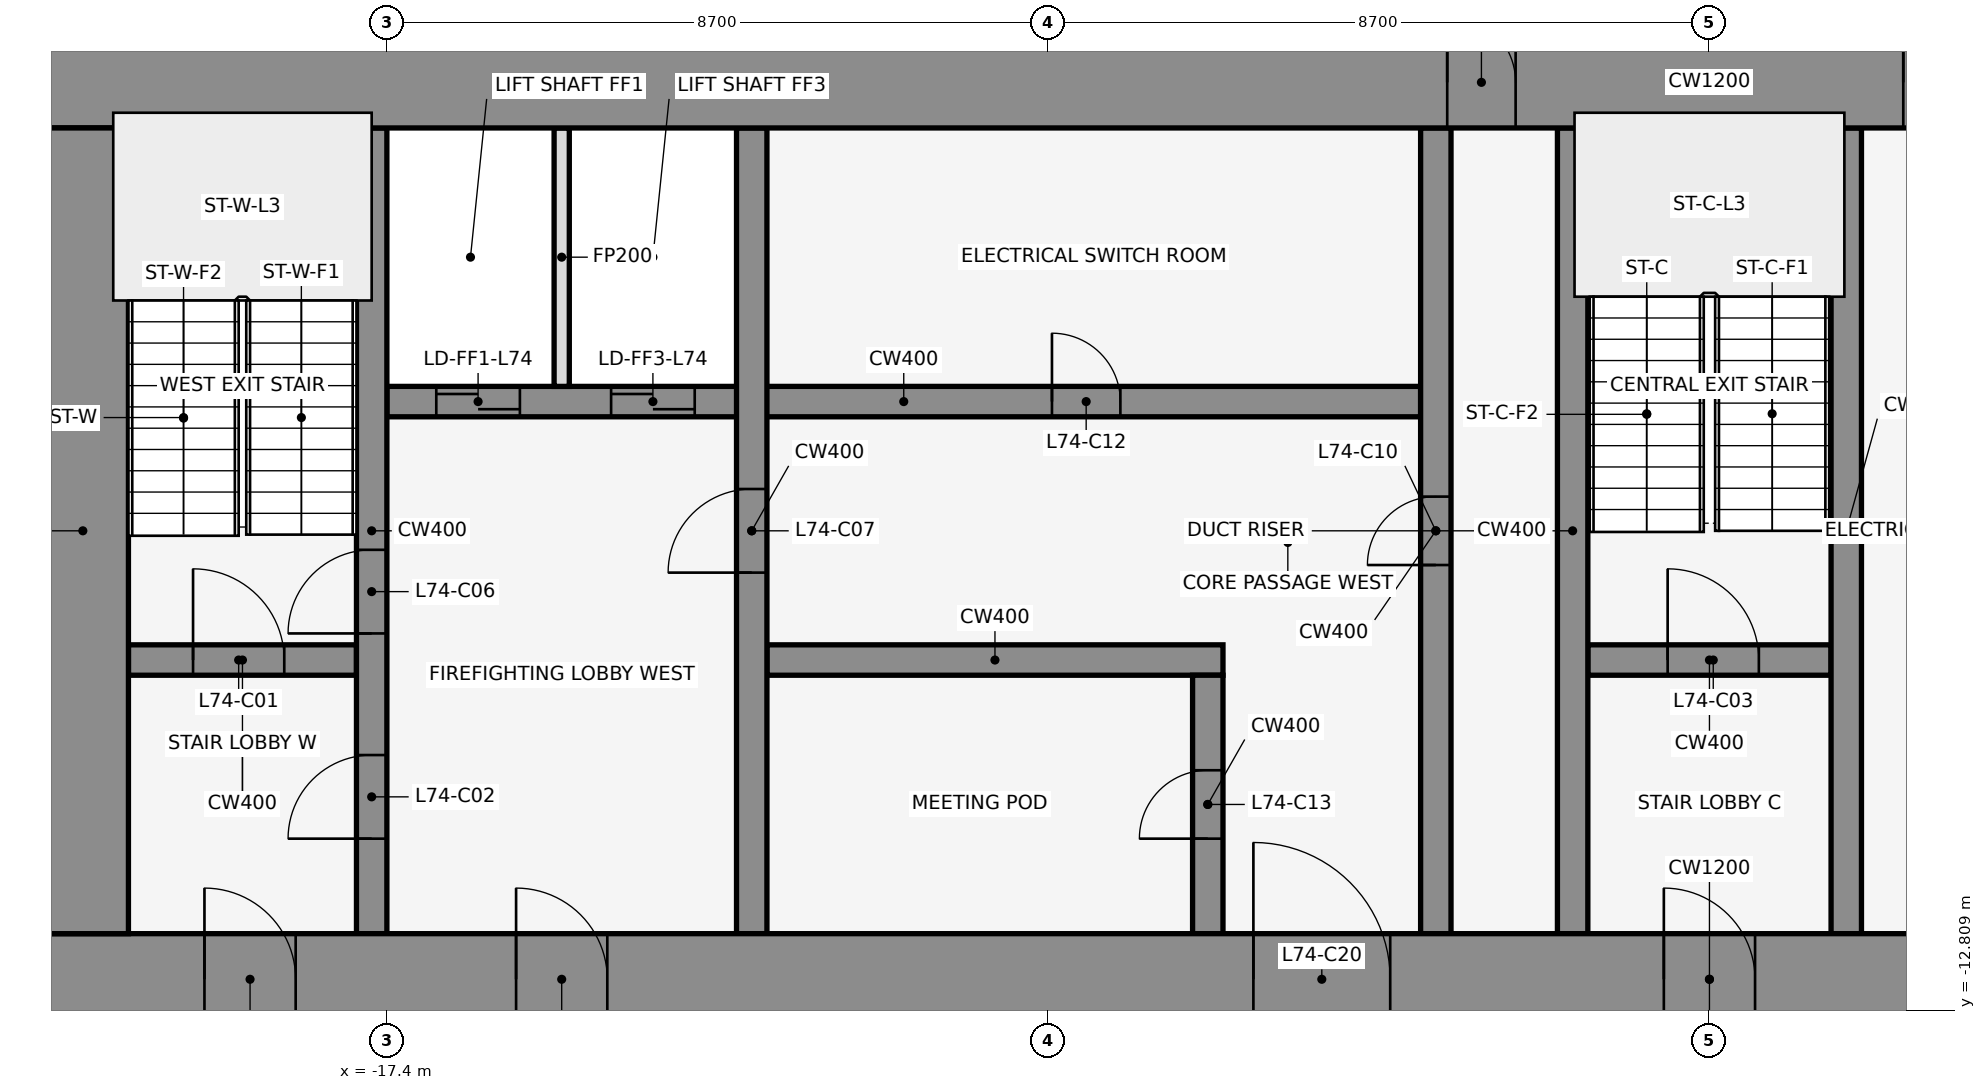
"""IFC4 building model, lengths in metres.
Left out: names, types, materials, properties, quantities, classifications, styles, units other than length and angle.
Written with IfcOpenShell. Run it as: python <this file> out.ifc"""

import sys

from ifc_helpers import new_model, si_unit, direction, frame, frame_2d, origin, place, context, subcontext, project, spatial, rectangle, extrude, element, fill, save


model = new_model("IFC4")
c1 = context("Model", 3, precision=1e-05, world=origin(), true_north=direction((0.0, 1.0)))
c2 = subcontext(c1, "Body", "Model", "MODEL_VIEW")
j1 = project(units=[si_unit("LENGTHUNIT", "METRE"), si_unit("PLANEANGLEUNIT", "RADIAN")], contexts=[c1])
p1 = place(None, origin())
s1 = spatial("IfcSite", under=j1, at=p1, CompositionType="ELEMENT")
p2 = place(p1, origin())
s2 = spatial("IfcBuilding", under=s1, at=p2, CompositionType="ELEMENT")
p3 = place(p2, frame((0.0, 0.0, 329.0)))
s3 = spatial("IfcBuildingStorey", under=s2, at=p3, CompositionType="ELEMENT", Elevation=329.0)
for number, where, z_axis, x_axis in (
    (1, (1.901, 1.08, 0.0), (0.0, 0.0, 1.0), (-0.84, -0.543, 0.0)),
    (2, (-0.068, -0.105, 0.0), (0.0, 0.0, 1.0), (-0.84, 0.543, 0.0)),
    (3, (-14.599, 1.08, 0.0), (0.0, 0.0, 1.0), (-0.84, -0.543, 0.0)),
):
    element("IfcWall", number, at=place(p3, frame(where, z_axis=z_axis, x_axis=x_axis)), inside=s3, PredefinedType="STANDARD", context=c2, shape_type="SweptSolid", body=[
        extrude(rectangle(XDim=2.183, YDim=0.25, at=frame_2d((1.091, 0.0))), origin(), (0.0, 0.0, 1.0), 4.35),
    ])
p4 = place(p3, frame((-20.8, -8.2, 0.0), z_axis=(0.0, 0.0, 1.0), x_axis=(1.0, 0.0, 0.0)))
e4 = element("IfcWall", 4, at=p4, inside=s3, PredefinedType="SHEAR", context=c2, shape_type="SweptSolid", body=[
    extrude(rectangle(XDim=3.0, YDim=0.4, at=frame_2d((1.5, 0.0))), origin(), (0.0, 0.0, 1.0), 4.5),
])
p5 = place(p4, frame((0.85, 0.0, 0.0)))
e5 = element("IfcOpeningElement", 5, at=p5, cuts=e4, PredefinedType="OPENING", context=c2, shape_type="SweptSolid", body=[
    extrude(rectangle(XDim=1.2, YDim=2.1, at=frame_2d((0.6, 1.05))), frame((0.0, 0.212, 0.0), z_axis=(0.0, -1.0, 0.0), x_axis=(1.0, 0.0, 0.0)), (0.0, 0.0, 1.0), 0.424),
])
p6 = place(p3, frame((-12.4, -8.2, 0.0), z_axis=(0.0, 0.0, 1.0), x_axis=(1.0, 0.0, 0.0)))
e6 = element("IfcWall", 6, at=p6, inside=s3, PredefinedType="SHEAR", context=c2, shape_type="SweptSolid", body=[
    extrude(rectangle(XDim=6.0, YDim=0.4, at=frame_2d((3.0, 0.0))), origin(), (0.0, 0.0, 1.0), 4.5),
])
p7 = place(p3, frame((-1.6, -8.2, 0.0), z_axis=(0.0, 0.0, 1.0), x_axis=(1.0, 0.0, 0.0)))
e7 = element("IfcWall", 7, at=p7, inside=s3, PredefinedType="SHEAR", context=c2, shape_type="SweptSolid", body=[
    extrude(rectangle(XDim=3.2, YDim=0.4, at=frame_2d((1.6, 0.0))), origin(), (0.0, 0.0, 1.0), 4.5),
])
p8 = place(p7, frame((1.05, 0.0, 0.0)))
e8 = element("IfcOpeningElement", 8, at=p8, cuts=e7, PredefinedType="OPENING", context=c2, shape_type="SweptSolid", body=[
    extrude(rectangle(XDim=1.2, YDim=2.1, at=frame_2d((0.6, 1.05))), frame((0.0, 0.212, 0.0), z_axis=(0.0, -1.0, 0.0), x_axis=(1.0, 0.0, 0.0)), (0.0, 0.0, 1.0), 0.424),
])
p9 = place(p3, frame((-17.4, -4.8, 0.0), z_axis=(0.0, 0.0, 1.0), x_axis=(1.0, 0.0, 0.0)))
e9 = element("IfcWall", 9, at=p9, inside=s3, PredefinedType="SHEAR", context=c2, shape_type="SweptSolid", body=[
    extrude(rectangle(XDim=13.6, YDim=0.4, at=frame_2d((6.8, 0.0))), origin(), (0.0, 0.0, 1.0), 4.5),
])
p10 = place(p9, frame((0.65, 0.0, 0.0)))
e10 = element("IfcOpeningElement", 10, at=p10, cuts=e9, PredefinedType="OPENING", context=c2, shape_type="SweptSolid", body=[
    extrude(rectangle(XDim=1.1, YDim=2.1, at=frame_2d((0.55, 1.05))), frame((0.0, 0.212, 0.0), z_axis=(0.0, -1.0, 0.0), x_axis=(1.0, 0.0, 0.0)), (0.0, 0.0, 1.0), 0.424),
])
p11 = place(p9, frame((2.95, 0.0, 0.0)))
e11 = element("IfcOpeningElement", 11, at=p11, cuts=e9, PredefinedType="OPENING", context=c2, shape_type="SweptSolid", body=[
    extrude(rectangle(XDim=1.1, YDim=2.1, at=frame_2d((0.55, 1.05))), frame((0.0, 0.212, 0.0), z_axis=(0.0, -1.0, 0.0), x_axis=(1.0, 0.0, 0.0)), (0.0, 0.0, 1.0), 0.424),
])
p12 = place(p9, frame((8.75, 0.0, 0.0)))
e12 = element("IfcOpeningElement", 12, at=p12, cuts=e9, PredefinedType="OPENING", context=c2, shape_type="SweptSolid", body=[
    extrude(rectangle(XDim=0.9, YDim=2.1, at=frame_2d((0.45, 1.05))), frame((0.0, 0.212, 0.0), z_axis=(0.0, -1.0, 0.0), x_axis=(1.0, 0.0, 0.0)), (0.0, 0.0, 1.0), 0.424),
])
p13 = place(p3, frame((-17.6, -11.8, 0.0), z_axis=(0.0, 0.0, 1.0), x_axis=(0.0, 1.0, 0.0)))
e13 = element("IfcWall", 13, at=p13, inside=s3, PredefinedType="SHEAR", context=c2, shape_type="SweptSolid", body=[
    extrude(rectangle(XDim=10.6, YDim=0.4, at=frame_2d((5.3, 0.0))), origin(), (0.0, 0.0, 1.0), 4.5),
])
p14 = place(p13, frame((1.25, 0.0, 0.0)))
e14 = element("IfcOpeningElement", 14, at=p14, cuts=e13, PredefinedType="OPENING", context=c2, shape_type="SweptSolid", body=[
    extrude(rectangle(XDim=1.1, YDim=2.1, at=frame_2d((0.55, 1.05))), frame((0.0, 0.212, 0.0), z_axis=(0.0, -1.0, 0.0), x_axis=(1.0, 0.0, 0.0)), (0.0, 0.0, 1.0), 0.424),
])
p15 = place(p13, frame((3.95, 0.0, 0.0)))
e15 = element("IfcOpeningElement", 15, at=p15, cuts=e13, PredefinedType="OPENING", context=c2, shape_type="SweptSolid", body=[
    extrude(rectangle(XDim=1.1, YDim=2.1, at=frame_2d((0.55, 1.05))), frame((0.0, 0.212, 0.0), z_axis=(0.0, -1.0, 0.0), x_axis=(1.0, 0.0, 0.0)), (0.0, 0.0, 1.0), 0.424),
])
p16 = place(p3, frame((-15.1, -4.6, 0.0), z_axis=(0.0, 0.0, 1.0), x_axis=(0.0, 1.0, 0.0)))
e16 = element("IfcWall", 16, at=p16, inside=s3, PredefinedType="PARTITIONING", context=c2, shape_type="SweptSolid", body=[
    extrude(rectangle(XDim=3.4, YDim=0.2, at=frame_2d((1.7, 0.0))), origin(), (0.0, 0.0, 1.0), 3.418),
])
p17 = place(p3, frame((-12.6, -11.8, 0.0), z_axis=(0.0, 0.0, 1.0), x_axis=(0.0, 1.0, 0.0)))
e17 = element("IfcWall", 17, at=p17, inside=s3, PredefinedType="SHEAR", context=c2, shape_type="SweptSolid", body=[
    extrude(rectangle(XDim=10.6, YDim=0.4, at=frame_2d((5.3, 0.0))), origin(), (0.0, 0.0, 1.0), 4.5),
])
p18 = place(p17, frame((4.75, 0.0, 0.0)))
e18 = element("IfcOpeningElement", 18, at=p18, cuts=e17, PredefinedType="OPENING", context=c2, shape_type="SweptSolid", body=[
    extrude(rectangle(XDim=1.1, YDim=2.1, at=frame_2d((0.55, 1.05))), frame((0.0, 0.212, 0.0), z_axis=(0.0, -1.0, 0.0), x_axis=(1.0, 0.0, 0.0)), (0.0, 0.0, 1.0), 0.424),
])
p19 = place(p3, frame((-6.6, -11.8, 0.0), z_axis=(0.0, 0.0, 1.0), x_axis=(0.0, 1.0, 0.0)))
e19 = element("IfcWall", 19, at=p19, inside=s3, PredefinedType="SHEAR", context=c2, shape_type="SweptSolid", body=[
    extrude(rectangle(XDim=3.4, YDim=0.4, at=frame_2d((1.7, 0.0))), origin(), (0.0, 0.0, 1.0), 4.5),
])
p20 = place(p19, frame((1.25, 0.0, 0.0)))
e20 = element("IfcOpeningElement", 20, at=p20, cuts=e19, PredefinedType="OPENING", context=c2, shape_type="SweptSolid", body=[
    extrude(rectangle(XDim=0.9, YDim=2.1, at=frame_2d((0.45, 1.05))), frame((0.0, 0.212, 0.0), z_axis=(0.0, -1.0, 0.0), x_axis=(1.0, 0.0, 0.0)), (0.0, 0.0, 1.0), 0.424),
])
p21 = place(p3, frame((-3.6, -11.8, 0.0), z_axis=(0.0, 0.0, 1.0), x_axis=(0.0, 1.0, 0.0)))
e21 = element("IfcWall", 21, at=p21, inside=s3, PredefinedType="SHEAR", context=c2, shape_type="SweptSolid", body=[
    extrude(rectangle(XDim=10.6, YDim=0.4, at=frame_2d((5.3, 0.0))), origin(), (0.0, 0.0, 1.0), 4.5),
])
p22 = place(p21, frame((4.85, 0.0, 0.0)))
e22 = element("IfcOpeningElement", 22, at=p22, cuts=e21, PredefinedType="OPENING", context=c2, shape_type="SweptSolid", body=[
    extrude(rectangle(XDim=0.9, YDim=2.1, at=frame_2d((0.45, 1.05))), frame((0.0, 0.212, 0.0), z_axis=(0.0, -1.0, 0.0), x_axis=(1.0, 0.0, 0.0)), (0.0, 0.0, 1.0), 0.424),
])
for number, where, z_axis, x_axis in (
    (23, (-1.8, -11.8, 0.0), (0.0, 0.0, 1.0), (0.0, 1.0, 0.0)),
    (24, (1.8, -11.8, 0.0), (0.0, 0.0, 1.0), (0.0, 1.0, 0.0)),
):
    element("IfcWall", number, at=place(p3, frame(where, z_axis=z_axis, x_axis=x_axis)), inside=s3, PredefinedType="SHEAR", context=c2, shape_type="SweptSolid", body=[
        extrude(rectangle(XDim=10.6, YDim=0.4, at=frame_2d((5.3, 0.0))), origin(), (0.0, 0.0, 1.0), 4.5),
    ])
p23 = place(p3, frame((-22.0, -0.6, 0.0), z_axis=(0.0, 0.0, 1.0), x_axis=(1.0, 0.0, 0.0)))
e25 = element("IfcWall", 25, at=p23, inside=s3, PredefinedType="SHEAR", context=c2, shape_type="SweptSolid", body=[
    extrude(rectangle(XDim=44.0, YDim=1.2, at=frame_2d((22.0, 0.0))), origin(), (0.0, 0.0, 1.0), 4.5),
])
p24 = place(p23, frame((18.55, 0.0, 0.0)))
e26 = element("IfcOpeningElement", 26, at=p24, cuts=e25, PredefinedType="OPENING", context=c2, shape_type="SweptSolid", body=[
    extrude(rectangle(XDim=0.9, YDim=2.1, at=frame_2d((0.45, 1.05))), frame((0.0, 0.612, 0.0), z_axis=(0.0, -1.0, 0.0), x_axis=(1.0, 0.0, 0.0)), (0.0, 0.0, 1.0), 1.224),
])
p25 = place(p23, frame((24.55, 0.0, 0.0)))
e27 = element("IfcOpeningElement", 27, at=p25, cuts=e25, PredefinedType="OPENING", context=c2, shape_type="SweptSolid", body=[
    extrude(rectangle(XDim=0.9, YDim=2.1, at=frame_2d((0.45, 1.05))), frame((0.0, 0.612, 0.0), z_axis=(0.0, -1.0, 0.0), x_axis=(1.0, 0.0, 0.0)), (0.0, 0.0, 1.0), 1.224),
])
p26 = place(p3, frame((-22.0, -12.4, 0.0), z_axis=(0.0, 0.0, 1.0), x_axis=(1.0, 0.0, 0.0)))
e28 = element("IfcWall", 28, at=p26, inside=s3, PredefinedType="SHEAR", context=c2, shape_type="SweptSolid", body=[
    extrude(rectangle(XDim=44.0, YDim=1.2, at=frame_2d((22.0, 0.0))), origin(), (0.0, 0.0, 1.0), 4.5),
])
p27 = place(p26, frame((2.2, 0.0, 0.0)))
e29 = element("IfcOpeningElement", 29, at=p27, cuts=e28, PredefinedType="OPENING", context=c2, shape_type="SweptSolid", body=[
    extrude(rectangle(XDim=1.2, YDim=2.1, at=frame_2d((0.6, 1.05))), frame((0.0, 0.612, 0.0), z_axis=(0.0, -1.0, 0.0), x_axis=(1.0, 0.0, 0.0)), (0.0, 0.0, 1.0), 1.224),
])
p28 = place(p26, frame((21.4, 0.0, 0.0)))
e30 = element("IfcOpeningElement", 30, at=p28, cuts=e28, PredefinedType="OPENING", context=c2, shape_type="SweptSolid", body=[
    extrude(rectangle(XDim=1.2, YDim=2.1, at=frame_2d((0.6, 1.05))), frame((0.0, 0.612, 0.0), z_axis=(0.0, -1.0, 0.0), x_axis=(1.0, 0.0, 0.0)), (0.0, 0.0, 1.0), 1.224),
])
p29 = place(p26, frame((40.6, 0.0, 0.0)))
e31 = element("IfcOpeningElement", 31, at=p29, cuts=e28, PredefinedType="OPENING", context=c2, shape_type="SweptSolid", body=[
    extrude(rectangle(XDim=1.2, YDim=2.1, at=frame_2d((0.6, 1.05))), frame((0.0, 0.612, 0.0), z_axis=(0.0, -1.0, 0.0), x_axis=(1.0, 0.0, 0.0)), (0.0, 0.0, 1.0), 1.224),
])
p30 = place(p26, frame((16.0, 0.0, 0.0)))
e32 = element("IfcOpeningElement", 32, at=p30, cuts=e28, PredefinedType="OPENING", context=c2, shape_type="SweptSolid", body=[
    extrude(rectangle(XDim=1.8, YDim=2.1, at=frame_2d((0.9, 1.05))), frame((0.0, 0.612, 0.0), z_axis=(0.0, -1.0, 0.0), x_axis=(1.0, 0.0, 0.0)), (0.0, 0.0, 1.0), 1.224),
])
p31 = place(p26, frame((6.3, 0.0, 0.0)))
e33 = element("IfcOpeningElement", 33, at=p31, cuts=e28, PredefinedType="OPENING", context=c2, shape_type="SweptSolid", body=[
    extrude(rectangle(XDim=1.2, YDim=2.1, at=frame_2d((0.6, 1.05))), frame((0.0, 0.612, 0.0), z_axis=(0.0, -1.0, 0.0), x_axis=(1.0, 0.0, 0.0)), (0.0, 0.0, 1.0), 1.224),
])
p32 = place(p26, frame((26.2, 0.0, 0.0)))
e34 = element("IfcOpeningElement", 34, at=p32, cuts=e28, PredefinedType="OPENING", context=c2, shape_type="SweptSolid", body=[
    extrude(rectangle(XDim=1.8, YDim=2.1, at=frame_2d((0.9, 1.05))), frame((0.0, 0.612, 0.0), z_axis=(0.0, -1.0, 0.0), x_axis=(1.0, 0.0, 0.0)), (0.0, 0.0, 1.0), 1.224),
])
p33 = place(p26, frame((36.5, 0.0, 0.0)))
e35 = element("IfcOpeningElement", 35, at=p33, cuts=e28, PredefinedType="OPENING", context=c2, shape_type="SweptSolid", body=[
    extrude(rectangle(XDim=1.2, YDim=2.1, at=frame_2d((0.6, 1.05))), frame((0.0, 0.612, 0.0), z_axis=(0.0, -1.0, 0.0), x_axis=(1.0, 0.0, 0.0)), (0.0, 0.0, 1.0), 1.224),
])
p34 = place(p3, frame((-21.4, -11.8, 0.0), z_axis=(0.0, 0.0, 1.0), x_axis=(0.0, 1.0, 0.0)))
e36 = element("IfcWall", 36, at=p34, inside=s3, PredefinedType="SHEAR", context=c2, shape_type="SweptSolid", body=[
    extrude(rectangle(XDim=10.6, YDim=1.2, at=frame_2d((5.3, 0.0))), origin(), (0.0, 0.0, 1.0), 4.5),
])
p35 = place(p5, origin())
e37 = element("IfcDoor", 37, at=p35, inside=s3, OperationType="SINGLE_SWING_LEFT", PredefinedType="DOOR", context=c2, shape_type="SweptSolid", body=[
    extrude(rectangle(XDim=1.2, YDim=2.1, at=frame_2d((0.6, 1.05))), frame((0.0, 0.025, 0.0), z_axis=(0.0, -1.0, 0.0), x_axis=(1.0, 0.0, 0.0)), (0.0, 0.0, 1.0), 0.05),
])
fill(e5, e37)
p36 = place(p14, frame((1.1, 0.0, 0.0), z_axis=(0.0, 0.0, 1.0), x_axis=(-1.0, 0.0, 0.0)))
e38 = element("IfcDoor", 38, at=p36, inside=s3, OperationType="SINGLE_SWING_LEFT", PredefinedType="DOOR", context=c2, shape_type="SweptSolid", body=[
    extrude(rectangle(XDim=1.1, YDim=2.1, at=frame_2d((0.55, 1.05))), frame((0.0, 0.025, 0.0), z_axis=(0.0, -1.0, 0.0), x_axis=(1.0, 0.0, 0.0)), (0.0, 0.0, 1.0), 0.05),
])
fill(e14, e38)
p37 = place(p8, origin())
e39 = element("IfcDoor", 39, at=p37, inside=s3, OperationType="SINGLE_SWING_LEFT", PredefinedType="DOOR", context=c2, shape_type="SweptSolid", body=[
    extrude(rectangle(XDim=1.2, YDim=2.1, at=frame_2d((0.6, 1.05))), frame((0.0, 0.025, 0.0), z_axis=(0.0, -1.0, 0.0), x_axis=(1.0, 0.0, 0.0)), (0.0, 0.0, 1.0), 0.05),
])
fill(e8, e39)
p38 = place(p10, origin())
e40 = element("IfcDoor", 40, at=p38, inside=s3, OperationType="DOUBLE_DOOR_SLIDING", PredefinedType="DOOR", context=c2, shape_type="SweptSolid", body=[
    extrude(rectangle(XDim=1.1, YDim=2.1, at=frame_2d((0.55, 1.05))), frame((0.0, 0.025, 0.0), z_axis=(0.0, -1.0, 0.0), x_axis=(1.0, 0.0, 0.0)), (0.0, 0.0, 1.0), 0.05),
])
fill(e10, e40)
p39 = place(p11, origin())
e41 = element("IfcDoor", 41, at=p39, inside=s3, OperationType="DOUBLE_DOOR_SLIDING", PredefinedType="DOOR", context=c2, shape_type="SweptSolid", body=[
    extrude(rectangle(XDim=1.1, YDim=2.1, at=frame_2d((0.55, 1.05))), frame((0.0, 0.025, 0.0), z_axis=(0.0, -1.0, 0.0), x_axis=(1.0, 0.0, 0.0)), (0.0, 0.0, 1.0), 0.05),
])
fill(e11, e41)
p40 = place(p15, frame((1.1, 0.0, 0.0), z_axis=(0.0, 0.0, 1.0), x_axis=(-1.0, 0.0, 0.0)))
e42 = element("IfcDoor", 42, at=p40, inside=s3, OperationType="SINGLE_SWING_LEFT", PredefinedType="DOOR", context=c2, shape_type="SweptSolid", body=[
    extrude(rectangle(XDim=1.1, YDim=2.1, at=frame_2d((0.55, 1.05))), frame((0.0, 0.025, 0.0), z_axis=(0.0, -1.0, 0.0), x_axis=(1.0, 0.0, 0.0)), (0.0, 0.0, 1.0), 0.05),
])
fill(e15, e42)
p41 = place(p18, origin())
e43 = element("IfcDoor", 43, at=p41, inside=s3, OperationType="SINGLE_SWING_LEFT", PredefinedType="DOOR", context=c2, shape_type="SweptSolid", body=[
    extrude(rectangle(XDim=1.1, YDim=2.1, at=frame_2d((0.55, 1.05))), frame((0.0, 0.025, 0.0), z_axis=(0.0, -1.0, 0.0), x_axis=(1.0, 0.0, 0.0)), (0.0, 0.0, 1.0), 0.05),
])
fill(e18, e43)
p42 = place(p22, frame((0.9, 0.0, 0.0), z_axis=(0.0, 0.0, 1.0), x_axis=(-1.0, 0.0, 0.0)))
e44 = element("IfcDoor", 44, at=p42, inside=s3, OperationType="SINGLE_SWING_LEFT", PredefinedType="DOOR", context=c2, shape_type="SweptSolid", body=[
    extrude(rectangle(XDim=0.9, YDim=2.1, at=frame_2d((0.45, 1.05))), frame((0.0, 0.025, 0.0), z_axis=(0.0, -1.0, 0.0), x_axis=(1.0, 0.0, 0.0)), (0.0, 0.0, 1.0), 0.05),
])
fill(e22, e44)
p43 = place(p12, origin())
e45 = element("IfcDoor", 45, at=p43, inside=s3, OperationType="SINGLE_SWING_RIGHT", PredefinedType="DOOR", context=c2, shape_type="SweptSolid", body=[
    extrude(rectangle(XDim=0.9, YDim=2.1, at=frame_2d((0.45, 1.05))), frame((0.0, 0.025, 0.0), z_axis=(0.0, -1.0, 0.0), x_axis=(1.0, 0.0, 0.0)), (0.0, 0.0, 1.0), 0.05),
])
fill(e12, e45)
p44 = place(p20, origin())
e46 = element("IfcDoor", 46, at=p44, inside=s3, OperationType="SINGLE_SWING_LEFT", PredefinedType="DOOR", context=c2, shape_type="SweptSolid", body=[
    extrude(rectangle(XDim=0.9, YDim=2.1, at=frame_2d((0.45, 1.05))), frame((0.0, 0.025, 0.0), z_axis=(0.0, -1.0, 0.0), x_axis=(1.0, 0.0, 0.0)), (0.0, 0.0, 1.0), 0.05),
])
fill(e20, e46)
p45 = place(p24, origin())
e47 = element("IfcDoor", 47, at=p45, inside=s3, OperationType="SINGLE_SWING_LEFT", PredefinedType="DOOR", context=c2, shape_type="SweptSolid", body=[
    extrude(rectangle(XDim=0.9, YDim=2.1, at=frame_2d((0.45, 1.05))), frame((0.0, 0.025, 0.0), z_axis=(0.0, -1.0, 0.0), x_axis=(1.0, 0.0, 0.0)), (0.0, 0.0, 1.0), 0.05),
])
fill(e26, e47)
p46 = place(p25, origin())
e48 = element("IfcDoor", 48, at=p46, inside=s3, OperationType="SINGLE_SWING_LEFT", PredefinedType="DOOR", context=c2, shape_type="SweptSolid", body=[
    extrude(rectangle(XDim=0.9, YDim=2.1, at=frame_2d((0.45, 1.05))), frame((0.0, 0.025, 0.0), z_axis=(0.0, -1.0, 0.0), x_axis=(1.0, 0.0, 0.0)), (0.0, 0.0, 1.0), 0.05),
])
fill(e27, e48)
p47 = place(p27, frame((1.2, 0.0, 0.0), z_axis=(0.0, 0.0, 1.0), x_axis=(-1.0, 0.0, 0.0)))
e49 = element("IfcDoor", 49, at=p47, inside=s3, OperationType="SINGLE_SWING_RIGHT", PredefinedType="DOOR", context=c2, shape_type="SweptSolid", body=[
    extrude(rectangle(XDim=1.2, YDim=2.1, at=frame_2d((0.6, 1.05))), frame((0.0, 0.025, 0.0), z_axis=(0.0, -1.0, 0.0), x_axis=(1.0, 0.0, 0.0)), (0.0, 0.0, 1.0), 0.05),
])
fill(e29, e49)
p48 = place(p28, frame((1.2, 0.0, 0.0), z_axis=(0.0, 0.0, 1.0), x_axis=(-1.0, 0.0, 0.0)))
e50 = element("IfcDoor", 50, at=p48, inside=s3, OperationType="SINGLE_SWING_RIGHT", PredefinedType="DOOR", context=c2, shape_type="SweptSolid", body=[
    extrude(rectangle(XDim=1.2, YDim=2.1, at=frame_2d((0.6, 1.05))), frame((0.0, 0.025, 0.0), z_axis=(0.0, -1.0, 0.0), x_axis=(1.0, 0.0, 0.0)), (0.0, 0.0, 1.0), 0.05),
])
fill(e30, e50)
p49 = place(p30, origin())
e51 = element("IfcDoor", 51, at=p49, inside=s3, OperationType="SINGLE_SWING_LEFT", PredefinedType="DOOR", context=c2, shape_type="SweptSolid", body=[
    extrude(rectangle(XDim=1.8, YDim=2.1, at=frame_2d((0.9, 1.05))), frame((0.0, 0.025, 0.0), z_axis=(0.0, -1.0, 0.0), x_axis=(1.0, 0.0, 0.0)), (0.0, 0.0, 1.0), 0.05),
])
fill(e32, e51)
p50 = place(p31, frame((1.2, 0.0, 0.0), z_axis=(0.0, 0.0, 1.0), x_axis=(-1.0, 0.0, 0.0)))
e52 = element("IfcDoor", 52, at=p50, inside=s3, OperationType="SINGLE_SWING_RIGHT", PredefinedType="DOOR", context=c2, shape_type="SweptSolid", body=[
    extrude(rectangle(XDim=1.2, YDim=2.1, at=frame_2d((0.6, 1.05))), frame((0.0, 0.025, 0.0), z_axis=(0.0, -1.0, 0.0), x_axis=(1.0, 0.0, 0.0)), (0.0, 0.0, 1.0), 0.05),
])
fill(e33, e52)
save(model, sys.argv[1])
